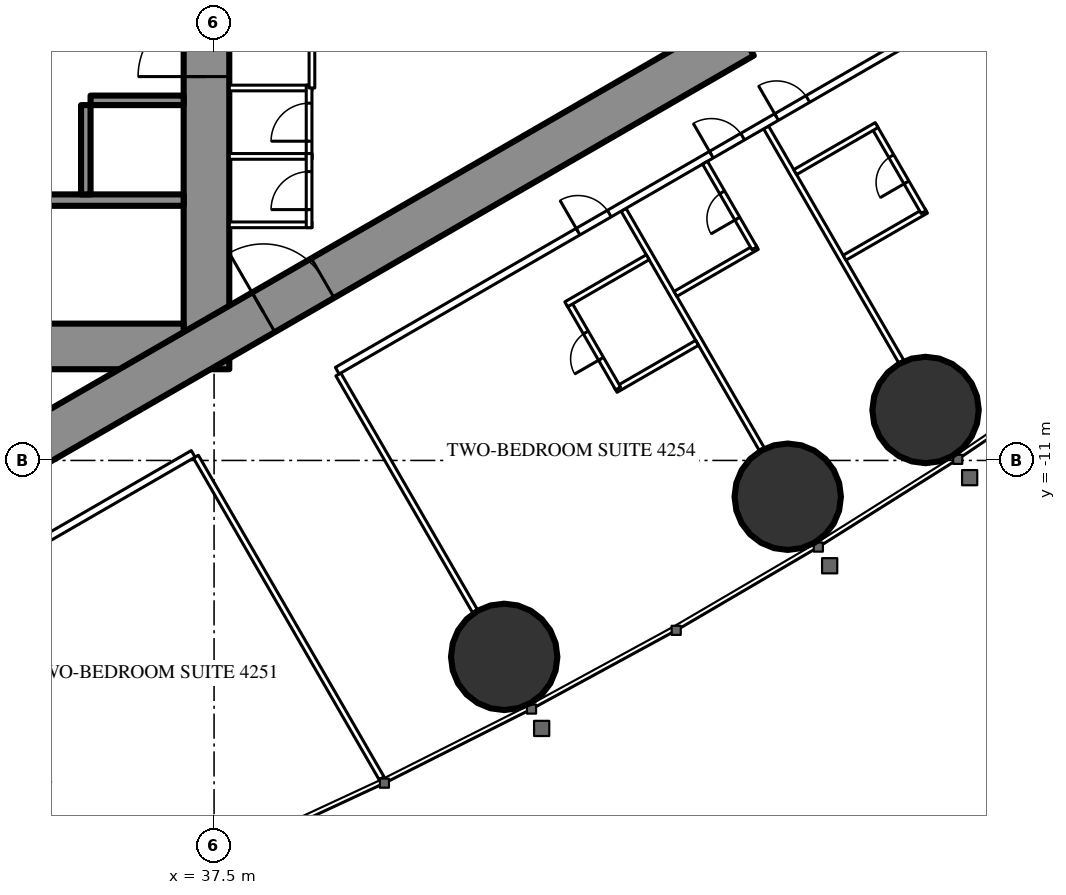
"""IFC4 building model, lengths in metres.
Left out: names, types, materials, properties, quantities, classifications, styles, units other than length and angle.
Written with IfcOpenShell. Run it as: python <this file> out.ifc"""

import sys

from ifc_helpers import new_model, si_unit, direction, frame, frame_2d, origin, origin_2d, place, context, subcontext, project, spatial, rectangle, circle, extrude, element, fill, save


model = new_model("IFC4")
c1 = context("Model", 3, precision=1e-05, world=origin(), true_north=direction((0.0, 1.0)))
c2 = subcontext(c1, "Body", "Model", "MODEL_VIEW")
j1 = project(units=[si_unit("LENGTHUNIT", "METRE"), si_unit("PLANEANGLEUNIT", "RADIAN")], contexts=[c1])
p1 = place(None, origin())
s1 = spatial("IfcSite", under=j1, at=p1, CompositionType="ELEMENT")
p2 = place(p1, origin())
s2 = spatial("IfcBuilding", under=s1, at=p2, CompositionType="ELEMENT")
p3 = place(p2, frame((0.0, 0.0, 159.8)))
s3 = spatial("IfcBuildingStorey", under=s2, at=p3, CompositionType="ELEMENT", Elevation=159.8)
for number, where, z_axis, x_axis in (
    (1, (45.134, -16.168, 0.0), (0.0, 0.0, 1.0), (1.0, 0.0, 0.0)),
    (2, (52.594, -11.955, 0.0), (0.0, 0.0, 1.0), (1.0, 0.0, 0.0)),
    (3, (56.221, -9.672, 0.0), (0.0, 0.0, 1.0), (1.0, 0.0, 0.0)),
):
    element("IfcColumn", number, at=place(p3, frame(where, z_axis=z_axis, x_axis=x_axis)), inside=s3, PredefinedType="COLUMN", context=c2, shape_type="SweptSolid", body=[
        extrude(circle(Radius=1.4, at=origin_2d()), origin(), (0.0, 0.0, 1.0), 3.5),
    ])
p4 = place(p3, frame((37.3, -8.6, 0.0), z_axis=(0.0, 0.0, 1.0), x_axis=(0.0, 1.0, 0.0)))
e4 = element("IfcWall", 4, at=p4, inside=s3, PredefinedType="SHEAR", context=c2, shape_type="SweptSolid", body=[
    extrude(rectangle(XDim=17.2, YDim=1.2, at=frame_2d((8.6, 0.0))), origin(), (0.0, 0.0, 1.0), 3.5),
])
p5 = place(p4, frame((7.7, 0.0, 0.0)))
e5 = element("IfcOpeningElement", 5, at=p5, cuts=e4, PredefinedType="OPENING", context=c2, shape_type="SweptSolid", body=[
    extrude(rectangle(XDim=1.8, YDim=2.2, at=frame_2d((0.9, 1.1))), frame((0.0, 0.61, 0.0), z_axis=(0.0, -1.0, 0.0), x_axis=(1.0, 0.0, 0.0)), (0.0, 0.0, 1.0), 1.22),
])
p6 = place(p3, frame((28.3, -8.0, 0.0), z_axis=(0.0, 0.0, 1.0), x_axis=(1.0, 0.0, 0.0)))
e6 = element("IfcWall", 6, at=p6, inside=s3, PredefinedType="SHEAR", context=c2, shape_type="SweptSolid", body=[
    extrude(rectangle(XDim=8.4, YDim=1.2, at=frame_2d((4.2, 0.0))), origin(), (0.0, 0.0, 1.0), 3.5),
])
p7 = place(p6, frame((0.25, 0.0, 0.0)))
e7 = element("IfcOpeningElement", 7, at=p7, cuts=e6, PredefinedType="OPENING", context=c2, shape_type="SweptSolid", body=[
    extrude(rectangle(XDim=1.0, YDim=2.2, at=frame_2d((0.5, 1.1))), frame((0.0, 0.61, 0.0), z_axis=(0.0, -1.0, 0.0), x_axis=(1.0, 0.0, 0.0)), (0.0, 0.0, 1.0), 1.22),
])
p8 = place(p3, frame((28.3, -4.15, 0.0), z_axis=(0.0, 0.0, 1.0), x_axis=(1.0, 0.0, 0.0)))
e8 = element("IfcWall", 8, at=p8, inside=s3, PredefinedType="SHEAR", context=c2, shape_type="SweptSolid", body=[
    extrude(rectangle(XDim=8.4, YDim=0.3, at=frame_2d((4.2, 0.0))), origin(), (0.0, 0.0, 1.0), 3.5),
])
p9 = place(p3, frame((34.125, -4.0, 0.0), z_axis=(0.0, 0.0, 1.0), x_axis=(0.0, 1.0, 0.0)))
e9 = element("IfcWall", 9, at=p9, inside=s3, PredefinedType="SHEAR", context=c2, shape_type="SweptSolid", body=[
    extrude(rectangle(XDim=2.35, YDim=0.25, at=frame_2d((1.175, 0.0))), origin(), (0.0, 0.0, 1.0), 3.5),
])
p10 = place(p3, frame((34.25, -1.525, 0.0), z_axis=(0.0, 0.0, 1.0), x_axis=(1.0, 0.0, 0.0)))
e10 = element("IfcWall", 10, at=p10, inside=s3, PredefinedType="SHEAR", context=c2, shape_type="SweptSolid", body=[
    extrude(rectangle(XDim=2.45, YDim=0.25, at=frame_2d((1.225, 0.0))), origin(), (0.0, 0.0, 1.0), 3.5),
])
p11 = place(p3, frame((27.2, -13.8, 0.0), z_axis=(0.0, 0.0, 1.0), x_axis=(0.866027159892, 0.499996958321, 0.0)))
e11 = element("IfcWall", 11, at=p11, inside=s3, PredefinedType="SHEAR", context=c2, shape_type="SweptSolid", body=[
    extrude(rectangle(XDim=27.947, YDim=1.2, at=frame_2d((13.973, 0.0))), origin(), (0.0, 0.0, 1.0), 3.5),
])
p12 = place(p11, frame((4.6, 0.0, 0.0)))
e12 = element("IfcOpeningElement", 12, at=p12, cuts=e11, PredefinedType="OPENING", context=c2, shape_type="SweptSolid", body=[
    extrude(rectangle(XDim=1.0, YDim=2.2, at=frame_2d((0.5, 1.1))), frame((0.0, 0.61, 0.0), z_axis=(0.0, -1.0, 0.0), x_axis=(1.0, 0.0, 0.0)), (0.0, 0.0, 1.0), 1.22),
])
p13 = place(p11, frame((13.395, 0.0, 0.0)))
e13 = element("IfcOpeningElement", 13, at=p13, cuts=e11, PredefinedType="OPENING", context=c2, shape_type="SweptSolid", body=[
    extrude(rectangle(XDim=1.8, YDim=2.2, at=frame_2d((0.9, 1.1))), frame((0.0, 0.61, 0.0), z_axis=(0.0, -1.0, 0.0), x_axis=(1.0, 0.0, 0.0)), (0.0, 0.0, 1.0), 1.22),
])
p14 = place(p3, frame((37.022, -10.9, 0.0), z_axis=(0.0, 0.0, 1.0), x_axis=(0.499998620953, -0.866026199976, 0.0)))
e14 = element("IfcWall", 14, at=p14, inside=s3, PredefinedType="PARTITIONING", context=c2, shape_type="SweptSolid", body=[
    extrude(rectangle(XDim=9.77, YDim=0.15, at=frame_2d((4.885, 0.0))), origin(), (0.0, 0.0, 1.0), 3.25),
])
p15 = place(p3, frame((40.769, -8.737, 0.0), z_axis=(0.0, 0.0, 1.0), x_axis=(0.500013115284, -0.866017831539, 0.0)))
e15 = element("IfcWall", 15, at=p15, inside=s3, PredefinedType="PARTITIONING", context=c2, shape_type="SweptSolid", body=[
    extrude(rectangle(XDim=7.198, YDim=0.15, at=frame_2d((3.599, 0.0))), origin(), (0.0, 0.0, 1.0), 2.3),
])
p16 = place(p3, frame((48.275, -4.404, 0.0), z_axis=(0.0, 0.0, 1.0), x_axis=(0.500006004368, -0.866021937133, 0.0)))
e16 = element("IfcWall", 16, at=p16, inside=s3, PredefinedType="PARTITIONING", context=c2, shape_type="SweptSolid", body=[
    extrude(rectangle(XDim=7.279, YDim=0.15, at=frame_2d((3.64, 0.0))), origin(), (0.0, 0.0, 1.0), 2.3),
])
p17 = place(p3, frame((52.025, -2.238, 0.0), z_axis=(0.0, 0.0, 1.0), x_axis=(0.499983785035, -0.866034765296, 0.0)))
e17 = element("IfcWall", 17, at=p17, inside=s3, PredefinedType="PARTITIONING", context=c2, shape_type="SweptSolid", body=[
    extrude(rectangle(XDim=7.116, YDim=0.15, at=frame_2d((3.558, 0.0))), origin(), (0.0, 0.0, 1.0), 2.3),
])
p18 = place(p3, frame((27.959, -16.017, 0.0), z_axis=(0.0, 0.0, 1.0), x_axis=(0.866026201739, 0.499998617899, 0.0)))
e18 = element("IfcWall", 18, at=p18, inside=s3, PredefinedType="PARTITIONING", context=c2, shape_type="SweptSolid", body=[
    extrude(rectangle(XDim=10.382, YDim=0.2, at=frame_2d((5.191, 0.0))), origin(), (0.0, 0.0, 1.0), 3.25),
])
p19 = place(p18, frame((0.6, 0.0, 0.0)))
e19 = element("IfcOpeningElement", 19, at=p19, cuts=e18, PredefinedType="OPENING", context=c2, shape_type="SweptSolid", body=[
    extrude(rectangle(XDim=0.95, YDim=2.2, at=frame_2d((0.475, 1.1))), frame((0.0, 0.11, 0.0), z_axis=(0.0, -1.0, 0.0), x_axis=(1.0, 0.0, 0.0)), (0.0, 0.0, 1.0), 0.22),
])
p20 = place(p3, frame((40.741, -8.638, 0.0), z_axis=(0.0, 0.0, 1.0), x_axis=(0.866022967338, 0.500004220025, 0.0)))
e20 = element("IfcWall", 20, at=p20, inside=s3, PredefinedType="PARTITIONING", context=c2, shape_type="SweptSolid", body=[
    extrude(rectangle(XDim=17.276, YDim=0.2, at=frame_2d((8.638, 0.0))), origin(), (0.0, 0.0, 1.0), 3.25),
])
p21 = place(p20, frame((7.316, 0.0, 0.0)))
e21 = element("IfcOpeningElement", 21, at=p21, cuts=e20, PredefinedType="OPENING", context=c2, shape_type="SweptSolid", body=[
    extrude(rectangle(XDim=0.95, YDim=2.2, at=frame_2d((0.475, 1.1))), frame((0.0, 0.11, 0.0), z_axis=(0.0, -1.0, 0.0), x_axis=(1.0, 0.0, 0.0)), (0.0, 0.0, 1.0), 0.22),
])
p22 = place(p20, frame((11.366, 0.0, 0.0)))
e22 = element("IfcOpeningElement", 22, at=p22, cuts=e20, PredefinedType="OPENING", context=c2, shape_type="SweptSolid", body=[
    extrude(rectangle(XDim=0.95, YDim=2.2, at=frame_2d((0.475, 1.1))), frame((0.0, 0.11, 0.0), z_axis=(0.0, -1.0, 0.0), x_axis=(1.0, 0.0, 0.0)), (0.0, 0.0, 1.0), 0.22),
])
p23 = place(p20, frame((13.347, 0.0, 0.0)))
e23 = element("IfcOpeningElement", 23, at=p23, cuts=e20, PredefinedType="OPENING", context=c2, shape_type="SweptSolid", body=[
    extrude(rectangle(XDim=0.95, YDim=2.2, at=frame_2d((0.475, 1.1))), frame((0.0, 0.11, 0.0), z_axis=(0.0, -1.0, 0.0), x_axis=(1.0, 0.0, 0.0)), (0.0, 0.0, 1.0), 0.22),
])
p24 = place(p3, frame((48.066, -9.143, 0.0), z_axis=(0.0, 0.0, 1.0), x_axis=(0.866006523861, 0.500032699561, 0.0)))
e24 = element("IfcWall", 24, at=p24, inside=s3, PredefinedType="PARTITIONING", context=c2, shape_type="SweptSolid", body=[
    extrude(rectangle(XDim=2.475, YDim=0.15, at=frame_2d((1.237, 0.0))), origin(), (0.0, 0.0, 1.0), 3.25),
])
p25 = place(p3, frame((46.831, -6.854, 0.0), z_axis=(0.0, 0.0, 1.0), x_axis=(0.500006934395, -0.866021400173, 0.0)))
e25 = element("IfcWall", 25, at=p25, inside=s3, PredefinedType="PARTITIONING", context=c2, shape_type="SweptSolid", body=[
    extrude(rectangle(XDim=2.6, YDim=0.15, at=frame_2d((1.3, 0.0))), origin(), (0.0, 0.0, 1.0), 3.25),
])
p26 = place(p25, frame((0.9, 0.0, 0.0)))
e26 = element("IfcOpeningElement", 26, at=p26, cuts=e25, PredefinedType="OPENING", context=c2, shape_type="SweptSolid", body=[
    extrude(rectangle(XDim=0.8, YDim=2.2, at=frame_2d((0.4, 1.1))), frame((0.0, 0.085, 0.0), z_axis=(0.0, -1.0, 0.0), x_axis=(1.0, 0.0, 0.0)), (0.0, 0.0, 1.0), 0.17),
])
for number, where, z_axis, x_axis in (
    (27, (46.766, -6.891, 0.0), (0.0, 0.0, 1.0), (0.866, 0.5, 0.0)),
    (28, (49.64, -6.618, 0.0), (0.0, 0.0, 1.0), (0.866, 0.5, 0.0)),
):
    element("IfcWall", number, at=place(p3, frame(where, z_axis=z_axis, x_axis=x_axis)), inside=s3, PredefinedType="PARTITIONING", context=c2, shape_type="SweptSolid", body=[
        extrude(rectangle(XDim=2.475, YDim=0.15, at=frame_2d((1.237, 0.0))), origin(), (0.0, 0.0, 1.0), 3.25),
    ])
p27 = place(p3, frame((50.418, -3.166, 0.0), z_axis=(0.0, 0.0, 1.0), x_axis=(0.499936506574, -0.866062058628, 0.0)))
e29 = element("IfcWall", 29, at=p27, inside=s3, PredefinedType="PARTITIONING", context=c2, shape_type="SweptSolid", body=[
    extrude(rectangle(XDim=2.6, YDim=0.15, at=frame_2d((1.3, 0.0))), origin(), (0.0, 0.0, 1.0), 3.25),
])
p28 = place(p27, frame((0.9, 0.0, 0.0)))
e30 = element("IfcOpeningElement", 30, at=p28, cuts=e29, PredefinedType="OPENING", context=c2, shape_type="SweptSolid", body=[
    extrude(rectangle(XDim=0.8, YDim=2.2, at=frame_2d((0.4, 1.1))), frame((0.0, 0.085, 0.0), z_axis=(0.0, -1.0, 0.0), x_axis=(1.0, 0.0, 0.0)), (0.0, 0.0, 1.0), 0.17),
])
p29 = place(p3, frame((54.09, -5.665, 0.0), z_axis=(0.0, 0.0, 1.0), x_axis=(0.866006523861, 0.500032699561, 0.0)))
e31 = element("IfcWall", 31, at=p29, inside=s3, PredefinedType="PARTITIONING", context=c2, shape_type="SweptSolid", body=[
    extrude(rectangle(XDim=2.475, YDim=0.15, at=frame_2d((1.237, 0.0))), origin(), (0.0, 0.0, 1.0), 3.25),
])
p30 = place(p3, frame((54.869, -2.213, 0.0), z_axis=(0.0, 0.0, 1.0), x_axis=(0.500047596559, -0.865997922154, 0.0)))
e32 = element("IfcWall", 32, at=p30, inside=s3, PredefinedType="PARTITIONING", context=c2, shape_type="SweptSolid", body=[
    extrude(rectangle(XDim=2.6, YDim=0.15, at=frame_2d((1.3, 0.0))), origin(), (0.0, 0.0, 1.0), 3.25),
])
p31 = place(p30, frame((0.9, 0.0, 0.0)))
e33 = element("IfcOpeningElement", 33, at=p31, cuts=e32, PredefinedType="OPENING", context=c2, shape_type="SweptSolid", body=[
    extrude(rectangle(XDim=0.8, YDim=2.2, at=frame_2d((0.4, 1.1))), frame((0.0, 0.085, 0.0), z_axis=(0.0, -1.0, 0.0), x_axis=(1.0, 0.0, 0.0)), (0.0, 0.0, 1.0), 0.17),
])
p32 = place(p3, frame((52.79, -3.413, 0.0), z_axis=(0.0, 0.0, 1.0), x_axis=(0.866006523861, 0.500032699561, 0.0)))
e34 = element("IfcWall", 34, at=p32, inside=s3, PredefinedType="PARTITIONING", context=c2, shape_type="SweptSolid", body=[
    extrude(rectangle(XDim=2.475, YDim=0.15, at=frame_2d((1.237, 0.0))), origin(), (0.0, 0.0, 1.0), 3.25),
])
for number, where, z_axis, x_axis in (
    (35, (37.9, -1.2, 0.0), (0.0, 0.0, 1.0), (1.0, 0.0, 0.0)),
    (36, (37.9, -3.0, 0.0), (0.0, 0.0, 1.0), (1.0, 0.0, 0.0)),
    (37, (37.9, -4.8, 0.0), (0.0, 0.0, 1.0), (1.0, 0.0, 0.0)),
):
    element("IfcWall", number, at=place(p3, frame(where, z_axis=z_axis, x_axis=x_axis)), inside=s3, PredefinedType="PARTITIONING", context=c2, shape_type="SweptSolid", body=[
        extrude(rectangle(XDim=2.175, YDim=0.15, at=frame_2d((1.087, 0.0))), origin(), (0.0, 0.0, 1.0), 3.25),
    ])
p33 = place(p3, frame((40.0, -3.075, 0.0), z_axis=(0.0, 0.0, 1.0), x_axis=(0.0, 1.0, 0.0)))
e38 = element("IfcWall", 38, at=p33, inside=s3, PredefinedType="PARTITIONING", context=c2, shape_type="SweptSolid", body=[
    extrude(rectangle(XDim=1.95, YDim=0.15, at=frame_2d((0.975, 0.0))), origin(), (0.0, 0.0, 1.0), 3.25),
])
p34 = place(p33, frame((0.475, 0.0, 0.0)))
e39 = element("IfcOpeningElement", 39, at=p34, cuts=e38, PredefinedType="OPENING", context=c2, shape_type="SweptSolid", body=[
    extrude(rectangle(XDim=1.0, YDim=2.2, at=frame_2d((0.5, 1.1))), frame((0.0, 0.085, 0.0), z_axis=(0.0, -1.0, 0.0), x_axis=(1.0, 0.0, 0.0)), (0.0, 0.0, 1.0), 0.17),
])
p35 = place(p3, frame((40.0, -4.875, 0.0), z_axis=(0.0, 0.0, 1.0), x_axis=(0.0, 1.0, 0.0)))
e40 = element("IfcWall", 40, at=p35, inside=s3, PredefinedType="PARTITIONING", context=c2, shape_type="SweptSolid", body=[
    extrude(rectangle(XDim=1.95, YDim=0.15, at=frame_2d((0.975, 0.0))), origin(), (0.0, 0.0, 1.0), 3.25),
])
p36 = place(p35, frame((0.475, 0.0, 0.0)))
e41 = element("IfcOpeningElement", 41, at=p36, cuts=e40, PredefinedType="OPENING", context=c2, shape_type="SweptSolid", body=[
    extrude(rectangle(XDim=1.0, YDim=2.2, at=frame_2d((0.5, 1.1))), frame((0.0, 0.085, 0.0), z_axis=(0.0, -1.0, 0.0), x_axis=(1.0, 0.0, 0.0)), (0.0, 0.0, 1.0), 0.17),
])
p37 = place(p3, frame((40.075, -1.2, 0.0), z_axis=(0.0, 0.0, 1.0), x_axis=(0.0, 1.0, 0.0)))
e42 = element("IfcWall", 42, at=p37, inside=s3, PredefinedType="PARTITIONING", context=c2, shape_type="SweptSolid", body=[
    extrude(rectangle(XDim=6.874, YDim=0.15, at=frame_2d((3.437, 0.0))), origin(), (0.0, 0.0, 1.0), 3.25),
])
p38 = place(p37, frame((2.537, 0.0, 0.0)))
e43 = element("IfcOpeningElement", 43, at=p38, cuts=e42, PredefinedType="OPENING", context=c2, shape_type="SweptSolid", body=[
    extrude(rectangle(XDim=1.8, YDim=2.2, at=frame_2d((0.9, 1.1))), frame((0.0, 0.085, 0.0), z_axis=(0.0, -1.0, 0.0), x_axis=(1.0, 0.0, 0.0)), (0.0, 0.0, 1.0), 0.17),
])
p39 = place(p26, origin())
e44 = element("IfcDoor", 44, at=p39, inside=s3, OperationType="SINGLE_SWING_RIGHT", PredefinedType="DOOR", context=c2, shape_type="SweptSolid", body=[
    extrude(rectangle(XDim=0.8, YDim=2.2, at=frame_2d((0.4, 1.1))), frame((0.0, 0.025, 0.0), z_axis=(0.0, -1.0, 0.0), x_axis=(1.0, 0.0, 0.0)), (0.0, 0.0, 1.0), 0.05),
])
fill(e26, e44)
p40 = place(p21, origin())
e45 = element("IfcDoor", 45, at=p40, inside=s3, OperationType="SINGLE_SWING_LEFT", PredefinedType="DOOR", context=c2, shape_type="SweptSolid", body=[
    extrude(rectangle(XDim=0.95, YDim=2.2, at=frame_2d((0.475, 1.1))), frame((0.0, 0.025, 0.0), z_axis=(0.0, -1.0, 0.0), x_axis=(1.0, 0.0, 0.0)), (0.0, 0.0, 1.0), 0.05),
])
fill(e21, e45)
p41 = place(p28, origin())
e46 = element("IfcDoor", 46, at=p41, inside=s3, OperationType="SINGLE_SWING_RIGHT", PredefinedType="DOOR", context=c2, shape_type="SweptSolid", body=[
    extrude(rectangle(XDim=0.8, YDim=2.2, at=frame_2d((0.4, 1.1))), frame((0.0, 0.025, 0.0), z_axis=(0.0, -1.0, 0.0), x_axis=(1.0, 0.0, 0.0)), (0.0, 0.0, 1.0), 0.05),
])
fill(e30, e46)
p42 = place(p22, origin())
e47 = element("IfcDoor", 47, at=p42, inside=s3, OperationType="SINGLE_SWING_LEFT", PredefinedType="DOOR", context=c2, shape_type="SweptSolid", body=[
    extrude(rectangle(XDim=0.95, YDim=2.2, at=frame_2d((0.475, 1.1))), frame((0.0, 0.025, 0.0), z_axis=(0.0, -1.0, 0.0), x_axis=(1.0, 0.0, 0.0)), (0.0, 0.0, 1.0), 0.05),
])
fill(e22, e47)
p43 = place(p31, origin())
e48 = element("IfcDoor", 48, at=p43, inside=s3, OperationType="SINGLE_SWING_RIGHT", PredefinedType="DOOR", context=c2, shape_type="SweptSolid", body=[
    extrude(rectangle(XDim=0.8, YDim=2.2, at=frame_2d((0.4, 1.1))), frame((0.0, 0.025, 0.0), z_axis=(0.0, -1.0, 0.0), x_axis=(1.0, 0.0, 0.0)), (0.0, 0.0, 1.0), 0.05),
])
fill(e33, e48)
p44 = place(p23, origin())
e49 = element("IfcDoor", 49, at=p44, inside=s3, OperationType="SINGLE_SWING_LEFT", PredefinedType="DOOR", context=c2, shape_type="SweptSolid", body=[
    extrude(rectangle(XDim=0.95, YDim=2.2, at=frame_2d((0.475, 1.1))), frame((0.0, 0.025, 0.0), z_axis=(0.0, -1.0, 0.0), x_axis=(1.0, 0.0, 0.0)), (0.0, 0.0, 1.0), 0.05),
])
fill(e23, e49)
p45 = place(p34, origin())
e50 = element("IfcDoor", 50, at=p45, inside=s3, OperationType="SINGLE_SWING_LEFT", PredefinedType="DOOR", context=c2, shape_type="SweptSolid", body=[
    extrude(rectangle(XDim=1.0, YDim=2.2, at=frame_2d((0.5, 1.1))), frame((0.0, 0.025, 0.0), z_axis=(0.0, -1.0, 0.0), x_axis=(1.0, 0.0, 0.0)), (0.0, 0.0, 1.0), 0.05),
])
fill(e39, e50)
p46 = place(p36, origin())
e51 = element("IfcDoor", 51, at=p46, inside=s3, OperationType="SINGLE_SWING_LEFT", PredefinedType="DOOR", context=c2, shape_type="SweptSolid", body=[
    extrude(rectangle(XDim=1.0, YDim=2.2, at=frame_2d((0.5, 1.1))), frame((0.0, 0.025, 0.0), z_axis=(0.0, -1.0, 0.0), x_axis=(1.0, 0.0, 0.0)), (0.0, 0.0, 1.0), 0.05),
])
fill(e41, e51)
p47 = place(p13, origin())
e52 = element("IfcDoor", 52, at=p47, inside=s3, OperationType="DOUBLE_DOOR_SINGLE_SWING", PredefinedType="DOOR", context=c2, shape_type="SweptSolid", body=[
    extrude(rectangle(XDim=1.8, YDim=2.2, at=frame_2d((0.9, 1.1))), frame((0.0, 0.025, 0.0), z_axis=(0.0, -1.0, 0.0), x_axis=(1.0, 0.0, 0.0)), (0.0, 0.0, 1.0), 0.05),
])
fill(e13, e52)
p48 = place(p5, origin())
e53 = element("IfcDoor", 53, at=p48, inside=s3, OperationType="DOUBLE_DOOR_SINGLE_SWING", PredefinedType="DOOR", context=c2, shape_type="SweptSolid", body=[
    extrude(rectangle(XDim=1.8, YDim=2.2, at=frame_2d((0.9, 1.1))), frame((0.0, 0.025, 0.0), z_axis=(0.0, -1.0, 0.0), x_axis=(1.0, 0.0, 0.0)), (0.0, 0.0, 1.0), 0.05),
])
fill(e5, e53)
save(model, sys.argv[1])
